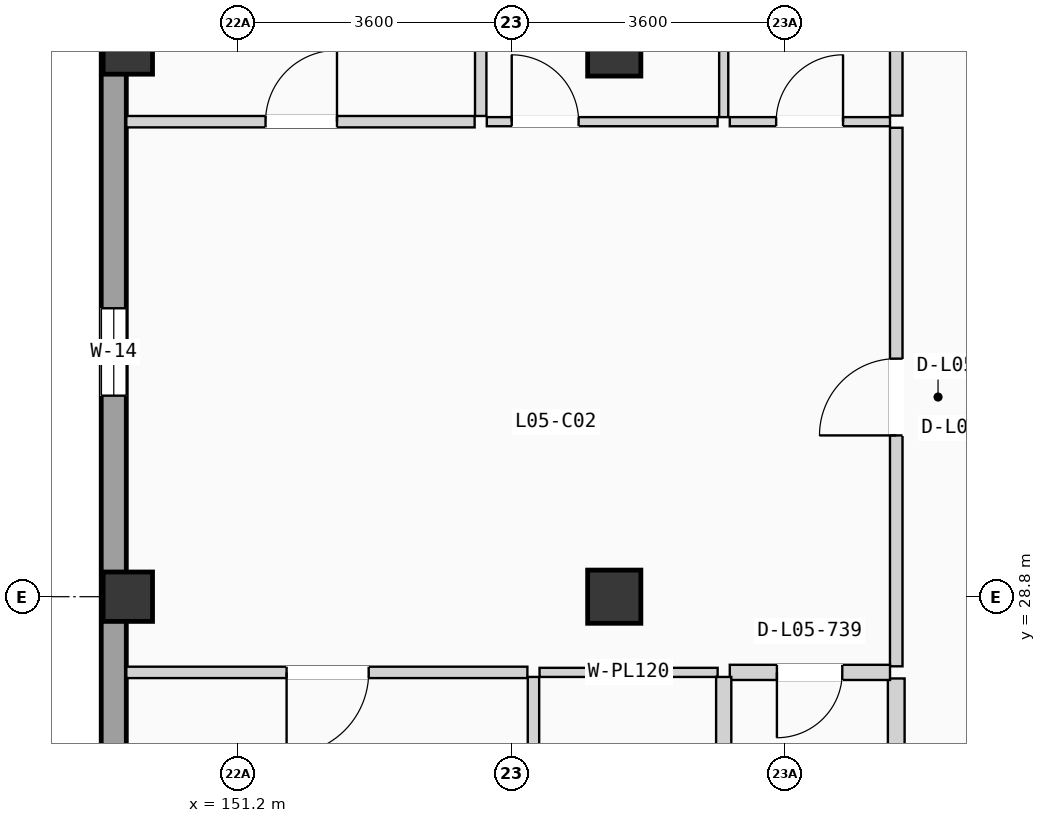
"""IFC4 building model, lengths in metres.
Left out: names, types, materials, properties, quantities, classifications, styles, units other than length and angle.
Written with IfcOpenShell. Run it as: python <this file> out.ifc"""

import sys

from ifc_helpers import new_model, si_unit, direction, frame, frame_2d, origin, origin_2d, place, context, subcontext, project, spatial, rectangle, extrude, element, fill, save


model = new_model("IFC4")
c1 = context("Model", 3, precision=1e-05, world=origin(), true_north=direction((0.0, 1.0)))
c2 = subcontext(c1, "Body", "Model", "MODEL_VIEW")
j1 = project(units=[si_unit("LENGTHUNIT", "METRE"), si_unit("PLANEANGLEUNIT", "RADIAN")], contexts=[c1])
p1 = place(None, origin())
s1 = spatial("IfcSite", under=j1, at=p1, CompositionType="ELEMENT")
p2 = place(p1, origin())
s2 = spatial("IfcBuilding", under=s1, at=p2, CompositionType="ELEMENT")
p3 = place(p2, frame((0.0, 0.0, 18.375)))
s3 = spatial("IfcBuildingStorey", under=s2, at=p3, CompositionType="ELEMENT", Elevation=18.375)
for number, where, z_axis, x_axis in (
    (1, (149.75, 28.8, 0.0), (0.0, 0.0, 1.0), (1.0, 0.0, 0.0)),
    (2, (149.75, 36.0, 0.0), (0.0, 0.0, 1.0), (1.0, 0.0, 0.0)),
):
    element("IfcColumn", number, at=place(p3, frame(where, z_axis=z_axis, x_axis=x_axis)), inside=s3, PredefinedType="COLUMN", context=c2, shape_type="SweptSolid", body=[
        extrude(rectangle(XDim=0.65, YDim=0.65, at=origin_2d()), origin(), (0.0, 0.0, 1.0), 3.15),
    ])
for number, where, z_axis, x_axis in (
    (3, (156.15, 28.8, 0.0), (0.0, 0.0, 1.0), (1.0, 0.0, 0.0)),
    (4, (156.15, 36.0, 0.0), (0.0, 0.0, 1.0), (1.0, 0.0, 0.0)),
):
    element("IfcColumn", number, at=place(p3, frame(where, z_axis=z_axis, x_axis=x_axis)), inside=s3, PredefinedType="COLUMN", context=c2, shape_type="SweptSolid", body=[
        extrude(rectangle(XDim=0.7, YDim=0.7, at=origin_2d()), origin(), (0.0, 0.0, 1.0), 3.15),
    ])
p4 = place(p3, frame((149.565, 0.33, 0.0), z_axis=(0.0, 0.0, 1.0), x_axis=(0.0, 1.0, 0.0)))
e5 = element("IfcWall", 5, at=p4, inside=s3, PredefinedType="SOLIDWALL", context=c2, shape_type="SweptSolid", body=[
    extrude(rectangle(XDim=49.74, YDim=0.33, at=frame_2d((24.87, 0.0))), origin(), (0.0, 0.0, 1.0), 2.89),
])
p5 = place(p4, frame((12.059, 0.0, 0.9)))
e6 = element("IfcOpeningElement", 6, at=p5, cuts=e5, PredefinedType="OPENING", context=c2, shape_type="SweptSolid", body=[
    extrude(rectangle(XDim=1.15, YDim=1.2, at=frame_2d((0.575, 0.6))), frame((0.0, 0.175, 0.0), z_axis=(0.0, -1.0, 0.0), x_axis=(1.0, 0.0, 0.0)), (0.0, 0.0, 1.0), 0.35),
])
p6 = place(p4, frame((8.714, 0.0, 0.855)))
e7 = element("IfcOpeningElement", 7, at=p6, cuts=e5, PredefinedType="OPENING", context=c2, shape_type="SweptSolid", body=[
    extrude(rectangle(XDim=1.15, YDim=1.35, at=frame_2d((0.575, 0.675))), frame((0.0, 0.175, 0.0), z_axis=(0.0, -1.0, 0.0), x_axis=(1.0, 0.0, 0.0)), (0.0, 0.0, 1.0), 0.35),
])
p7 = place(p4, frame((17.962, 0.0, 0.705)))
e8 = element("IfcOpeningElement", 8, at=p7, cuts=e5, PredefinedType="OPENING", context=c2, shape_type="SweptSolid", body=[
    extrude(rectangle(XDim=1.15, YDim=1.5, at=frame_2d((0.575, 0.75))), frame((0.0, 0.175, 0.0), z_axis=(0.0, -1.0, 0.0), x_axis=(1.0, 0.0, 0.0)), (0.0, 0.0, 1.0), 0.35),
])
p8 = place(p4, frame((31.115, 0.0, 0.555)))
e9 = element("IfcOpeningElement", 9, at=p8, cuts=e5, PredefinedType="OPENING", context=c2, shape_type="SweptSolid", body=[
    extrude(rectangle(XDim=1.15, YDim=1.65, at=frame_2d((0.575, 0.825))), frame((0.0, 0.175, 0.0), z_axis=(0.0, -1.0, 0.0), x_axis=(1.0, 0.0, 0.0)), (0.0, 0.0, 1.0), 0.35),
])
p9 = place(p4, frame((23.992, 0.0, 0.85)))
e10 = element("IfcOpeningElement", 10, at=p9, cuts=e5, PredefinedType="OPENING", context=c2, shape_type="SweptSolid", body=[
    extrude(rectangle(XDim=0.95, YDim=1.2, at=frame_2d((0.475, 0.6))), frame((0.0, 0.175, 0.0), z_axis=(0.0, -1.0, 0.0), x_axis=(1.0, 0.0, 0.0)), (0.0, 0.0, 1.0), 0.35),
])
p10 = place(p4, frame((38.58, 0.0, 0.9)))
e11 = element("IfcOpeningElement", 11, at=p10, cuts=e5, PredefinedType="OPENING", context=c2, shape_type="SweptSolid", body=[
    extrude(rectangle(XDim=1.25, YDim=1.2, at=frame_2d((0.625, 0.6))), frame((0.0, 0.175, 0.0), z_axis=(0.0, -1.0, 0.0), x_axis=(1.0, 0.0, 0.0)), (0.0, 0.0, 1.0), 0.35),
])
p11 = place(p3, frame((159.86, 27.884, 0.0), z_axis=(0.0, 0.0, 1.0), x_axis=(0.0, 1.0, 0.0)))
e12 = element("IfcWall", 12, at=p11, inside=s3, PredefinedType="PARTITIONING", context=c2, shape_type="SweptSolid", body=[
    extrude(rectangle(XDim=7.086, YDim=0.165, at=frame_2d((3.543, 0.0))), origin(), (0.0, 0.0, 1.0), 2.87),
])
p12 = place(p11, frame((3.038, 0.0, 0.0)))
e13 = element("IfcOpeningElement", 13, at=p12, cuts=e12, PredefinedType="OPENING", context=c2, shape_type="SweptSolid", body=[
    extrude(rectangle(XDim=1.01, YDim=2.11, at=frame_2d((0.505, 1.055))), frame((0.0, 0.093, 0.0), z_axis=(0.0, -1.0, 0.0), x_axis=(1.0, 0.0, 0.0)), (0.0, 0.0, 1.0), 0.185),
])
p13 = place(p3, frame((159.86, 21.066, 0.0), z_axis=(0.0, 0.0, 1.0), x_axis=(0.0, 1.0, 0.0)))
e14 = element("IfcWall", 14, at=p13, inside=s3, PredefinedType="PLUMBINGWALL", context=c2, shape_type="SweptSolid", body=[
    extrude(rectangle(XDim=6.658, YDim=0.22, at=frame_2d((3.329, 0.0))), origin(), (0.0, 0.0, 1.0), 2.87),
])
p14 = place(p3, frame((159.86, 35.13, 0.0), z_axis=(0.0, 0.0, 1.0), x_axis=(0.0, 1.0, 0.0)))
e15 = element("IfcWall", 15, at=p14, inside=s3, PredefinedType="PARTITIONING", context=c2, shape_type="SweptSolid", body=[
    extrude(rectangle(XDim=7.67, YDim=0.165, at=frame_2d((3.835, 0.0))), origin(), (0.0, 0.0, 1.0), 2.87),
])
p15 = place(p3, frame((157.67, 27.804, 0.0), z_axis=(0.0, 0.0, 1.0), x_axis=(1.0, 0.0, 0.0)))
e16 = element("IfcWall", 16, at=p15, inside=s3, PredefinedType="PLUMBINGWALL", context=c2, shape_type="SweptSolid", body=[
    extrude(rectangle(XDim=2.108, YDim=0.2, at=frame_2d((1.054, 0.0))), origin(), (0.0, 0.0, 1.0), 2.87),
])
p16 = place(p15, frame((0.62, 0.0, 0.0)))
e17 = element("IfcOpeningElement", 17, at=p16, cuts=e16, PredefinedType="OPENING", context=c2, shape_type="SweptSolid", body=[
    extrude(rectangle(XDim=0.86, YDim=2.0, at=frame_2d((0.43, 1.0))), frame((0.0, 0.11, 0.0), z_axis=(0.0, -1.0, 0.0), x_axis=(1.0, 0.0, 0.0)), (0.0, 0.0, 1.0), 0.22),
])
p17 = place(p3, frame((157.67, 35.05, 0.0), z_axis=(0.0, 0.0, 1.0), x_axis=(1.0, 0.0, 0.0)))
e18 = element("IfcWall", 18, at=p17, inside=s3, PredefinedType="PARTITIONING", context=c2, shape_type="SweptSolid", body=[
    extrude(rectangle(XDim=2.108, YDim=0.12, at=frame_2d((1.054, 0.0))), origin(), (0.0, 0.0, 1.0), 2.87),
])
p18 = place(p17, frame((0.61, 0.0, 0.0)))
e19 = element("IfcOpeningElement", 19, at=p18, cuts=e18, PredefinedType="OPENING", context=c2, shape_type="SweptSolid", body=[
    extrude(rectangle(XDim=0.88, YDim=2.02, at=frame_2d((0.44, 1.01))), frame((0.0, 0.07, 0.0), z_axis=(0.0, -1.0, 0.0), x_axis=(1.0, 0.0, 0.0)), (0.0, 0.0, 1.0), 0.14),
])
p19 = place(p3, frame((149.73, 27.804, 0.0), z_axis=(0.0, 0.0, 1.0), x_axis=(1.0, 0.0, 0.0)))
e20 = element("IfcWall", 20, at=p19, inside=s3, PredefinedType="PARTITIONING", context=c2, shape_type="SweptSolid", body=[
    extrude(rectangle(XDim=5.277, YDim=0.15, at=frame_2d((2.639, 0.0))), origin(), (0.0, 0.0, 1.0), 2.87),
])
p20 = place(p19, frame((2.109, 0.0, 0.0)))
e21 = element("IfcOpeningElement", 21, at=p20, cuts=e20, PredefinedType="OPENING", context=c2, shape_type="SweptSolid", body=[
    extrude(rectangle(XDim=1.08, YDim=2.1, at=frame_2d((0.54, 1.05))), frame((0.0, 0.085, 0.0), z_axis=(0.0, -1.0, 0.0), x_axis=(1.0, 0.0, 0.0)), (0.0, 0.0, 1.0), 0.17),
])
p21 = place(p3, frame((155.167, 27.804, 0.0), z_axis=(0.0, 0.0, 1.0), x_axis=(1.0, 0.0, 0.0)))
e22 = element("IfcWall", 22, at=p21, inside=s3, PredefinedType="PARTITIONING", context=c2, shape_type="SweptSolid", body=[
    extrude(rectangle(XDim=2.343, YDim=0.12, at=frame_2d((1.171, 0.0))), origin(), (0.0, 0.0, 1.0), 2.87),
])
p22 = place(p3, frame((149.73, 35.05, 0.0), z_axis=(0.0, 0.0, 1.0), x_axis=(1.0, 0.0, 0.0)))
e23 = element("IfcWall", 23, at=p22, inside=s3, PredefinedType="PARTITIONING", context=c2, shape_type="SweptSolid", body=[
    extrude(rectangle(XDim=4.583, YDim=0.15, at=frame_2d((2.292, 0.0))), origin(), (0.0, 0.0, 1.0), 2.87),
])
p23 = place(p22, frame((1.832, 0.0, 0.0)))
e24 = element("IfcOpeningElement", 24, at=p23, cuts=e23, PredefinedType="OPENING", context=c2, shape_type="SweptSolid", body=[
    extrude(rectangle(XDim=0.94, YDim=2.06, at=frame_2d((0.47, 1.03))), frame((0.0, 0.085, 0.0), z_axis=(0.0, -1.0, 0.0), x_axis=(1.0, 0.0, 0.0)), (0.0, 0.0, 1.0), 0.17),
])
p24 = place(p3, frame((154.473, 35.05, 0.0), z_axis=(0.0, 0.0, 1.0), x_axis=(1.0, 0.0, 0.0)))
e25 = element("IfcWall", 25, at=p24, inside=s3, PredefinedType="PARTITIONING", context=c2, shape_type="SweptSolid", body=[
    extrude(rectangle(XDim=3.037, YDim=0.12, at=frame_2d((1.519, 0.0))), origin(), (0.0, 0.0, 1.0), 2.87),
])
p25 = place(p24, frame((0.328, 0.0, 0.0)))
e26 = element("IfcOpeningElement", 26, at=p25, cuts=e25, PredefinedType="OPENING", context=c2, shape_type="SweptSolid", body=[
    extrude(rectangle(XDim=0.88, YDim=2.02, at=frame_2d((0.44, 1.01))), frame((0.0, 0.07, 0.0), z_axis=(0.0, -1.0, 0.0), x_axis=(1.0, 0.0, 0.0)), (0.0, 0.0, 1.0), 0.14),
])
p26 = place(p3, frame((157.59, 21.066, 0.0), z_axis=(0.0, 0.0, 1.0), x_axis=(0.0, 1.0, 0.0)))
e27 = element("IfcWall", 27, at=p26, inside=s3, PredefinedType="PLUMBINGWALL", context=c2, shape_type="SweptSolid", body=[
    extrude(rectangle(XDim=6.678, YDim=0.2, at=frame_2d((3.339, 0.0))), origin(), (0.0, 0.0, 1.0), 2.87),
])
p27 = place(p26, frame((2.904, 0.0, 0.0)))
e28 = element("IfcOpeningElement", 28, at=p27, cuts=e27, PredefinedType="OPENING", context=c2, shape_type="SweptSolid", body=[
    extrude(rectangle(XDim=0.85, YDim=2.01, at=frame_2d((0.425, 1.005))), frame((0.0, 0.11, 0.0), z_axis=(0.0, -1.0, 0.0), x_axis=(1.0, 0.0, 0.0)), (0.0, 0.0, 1.0), 0.22),
])
p28 = place(p3, frame((157.59, 35.11, 0.0), z_axis=(0.0, 0.0, 1.0), x_axis=(0.0, 1.0, 0.0)))
e29 = element("IfcWall", 29, at=p28, inside=s3, PredefinedType="PARTITIONING", context=c2, shape_type="SweptSolid", body=[
    extrude(rectangle(XDim=7.69, YDim=0.12, at=frame_2d((3.845, 0.0))), origin(), (0.0, 0.0, 1.0), 2.87),
])
p29 = place(p3, frame((155.087, 21.066, 0.0), z_axis=(0.0, 0.0, 1.0), x_axis=(0.0, 1.0, 0.0)))
e30 = element("IfcWall", 30, at=p29, inside=s3, PredefinedType="PARTITIONING", context=c2, shape_type="SweptSolid", body=[
    extrude(rectangle(XDim=6.678, YDim=0.15, at=frame_2d((3.339, 0.0))), origin(), (0.0, 0.0, 1.0), 2.87),
])
p30 = place(p3, frame((154.393, 35.125, 0.0), z_axis=(0.0, 0.0, 1.0), x_axis=(0.0, 1.0, 0.0)))
e31 = element("IfcWall", 31, at=p30, inside=s3, PredefinedType="PARTITIONING", context=c2, shape_type="SweptSolid", body=[
    extrude(rectangle(XDim=7.675, YDim=0.15, at=frame_2d((3.837, 0.0))), origin(), (0.0, 0.0, 1.0), 2.87),
])
p31 = place(p8, origin())
e32 = element("IfcWindow", 32, at=p31, inside=s3, PartitioningType="SINGLE_PANEL", PredefinedType="WINDOW", context=c2, shape_type="SweptSolid", body=[
    extrude(rectangle(XDim=1.15, YDim=1.65, at=frame_2d((0.575, 0.825))), frame((0.0, 0.03, 0.0), z_axis=(0.0, -1.0, 0.0), x_axis=(1.0, 0.0, 0.0)), (0.0, 0.0, 1.0), 0.06),
])
fill(e9, e32)
p32 = place(p12, origin())
e33 = element("IfcDoor", 33, at=p32, inside=s3, OperationType="SINGLE_SWING_LEFT", PredefinedType="DOOR", context=c2, shape_type="SweptSolid", body=[
    extrude(rectangle(XDim=1.01, YDim=2.11, at=frame_2d((0.505, 1.055))), frame((0.0, 0.025, 0.0), z_axis=(0.0, -1.0, 0.0), x_axis=(1.0, 0.0, 0.0)), (0.0, 0.0, 1.0), 0.05),
])
fill(e13, e33)
p33 = place(p16, frame((0.86, 0.0, 0.0), z_axis=(0.0, 0.0, 1.0), x_axis=(-1.0, 0.0, 0.0)))
e34 = element("IfcDoor", 34, at=p33, inside=s3, OperationType="SINGLE_SWING_LEFT", PredefinedType="DOOR", context=c2, shape_type="SweptSolid", body=[
    extrude(rectangle(XDim=0.86, YDim=2.0, at=frame_2d((0.43, 1.0))), frame((0.0, 0.025, 0.0), z_axis=(0.0, -1.0, 0.0), x_axis=(1.0, 0.0, 0.0)), (0.0, 0.0, 1.0), 0.05),
])
fill(e17, e34)
p34 = place(p18, origin())
e35 = element("IfcDoor", 35, at=p34, inside=s3, OperationType="SINGLE_SWING_RIGHT", PredefinedType="DOOR", context=c2, shape_type="SweptSolid", body=[
    extrude(rectangle(XDim=0.88, YDim=2.02, at=frame_2d((0.44, 1.01))), frame((0.0, 0.025, 0.0), z_axis=(0.0, -1.0, 0.0), x_axis=(1.0, 0.0, 0.0)), (0.0, 0.0, 1.0), 0.05),
])
fill(e19, e35)
p35 = place(p20, frame((1.08, 0.0, 0.0), z_axis=(0.0, 0.0, 1.0), x_axis=(-1.0, 0.0, 0.0)))
e36 = element("IfcDoor", 36, at=p35, inside=s3, OperationType="SINGLE_SWING_LEFT", PredefinedType="DOOR", context=c2, shape_type="SweptSolid", body=[
    extrude(rectangle(XDim=1.08, YDim=2.1, at=frame_2d((0.54, 1.05))), frame((0.0, 0.025, 0.0), z_axis=(0.0, -1.0, 0.0), x_axis=(1.0, 0.0, 0.0)), (0.0, 0.0, 1.0), 0.05),
])
fill(e21, e36)
p36 = place(p23, origin())
e37 = element("IfcDoor", 37, at=p36, inside=s3, OperationType="SINGLE_SWING_RIGHT", PredefinedType="DOOR", context=c2, shape_type="SweptSolid", body=[
    extrude(rectangle(XDim=0.94, YDim=2.06, at=frame_2d((0.47, 1.03))), frame((0.0, 0.025, 0.0), z_axis=(0.0, -1.0, 0.0), x_axis=(1.0, 0.0, 0.0)), (0.0, 0.0, 1.0), 0.05),
])
fill(e24, e37)
p37 = place(p25, origin())
e38 = element("IfcDoor", 38, at=p37, inside=s3, OperationType="SINGLE_SWING_LEFT", PredefinedType="DOOR", context=c2, shape_type="SweptSolid", body=[
    extrude(rectangle(XDim=0.88, YDim=2.02, at=frame_2d((0.44, 1.01))), frame((0.0, 0.025, 0.0), z_axis=(0.0, -1.0, 0.0), x_axis=(1.0, 0.0, 0.0)), (0.0, 0.0, 1.0), 0.05),
])
fill(e26, e38)
save(model, sys.argv[1])
